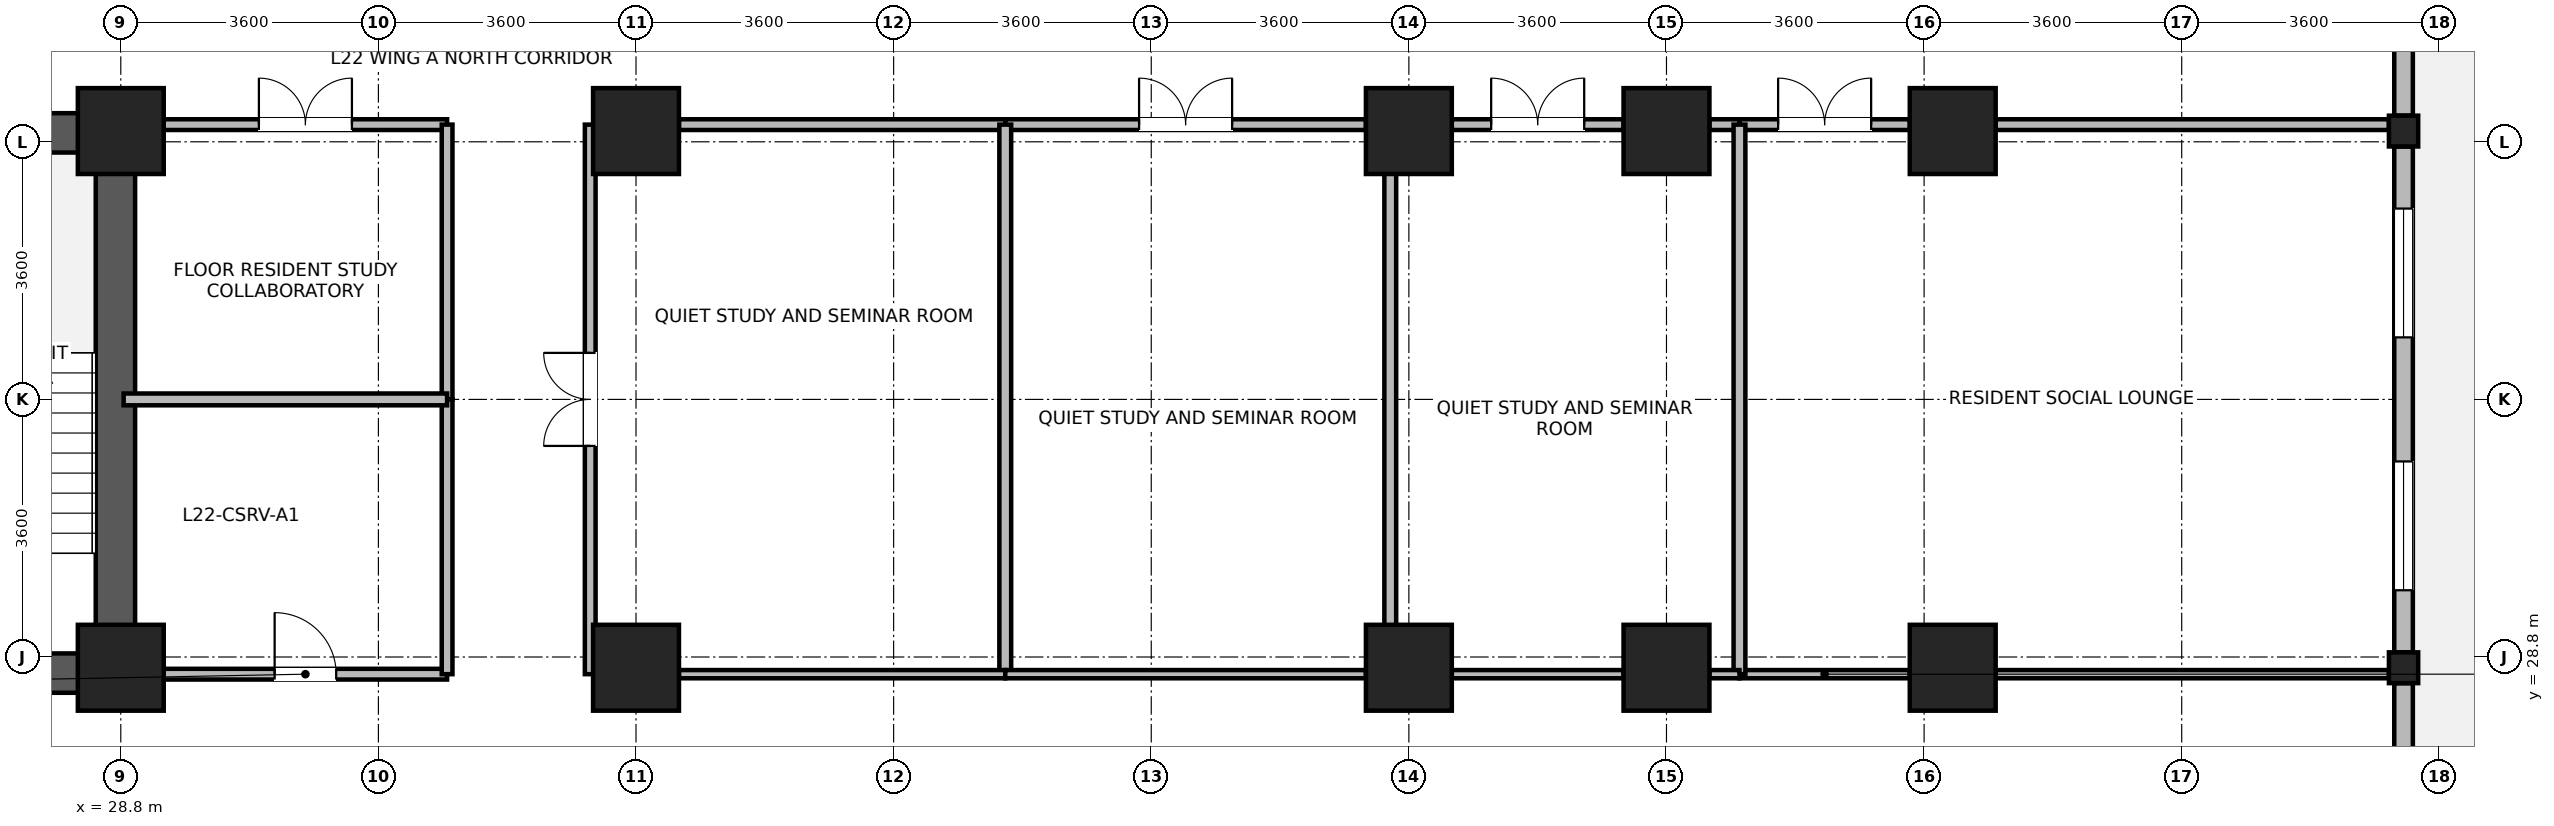
"""IFC4 building model, lengths in metres.
Left out: names, types, materials, properties, quantities, classifications, styles, units other than length and angle.
Written with IfcOpenShell. Run it as: python <this file> out.ifc"""

import sys

from ifc_helpers import new_model, si_unit, direction, frame, frame_2d, origin, origin_2d, place, context, subcontext, project, spatial, rectangle, i_section, extrude, source, transform, mapped, element, fill, save


model = new_model("IFC4")
c1 = context("Model", 3, precision=1e-05, world=origin(), true_north=direction((0.0, 1.0)))
c2 = subcontext(c1, "Body", "Model", "MODEL_VIEW")
j1 = project(units=[si_unit("LENGTHUNIT", "METRE"), si_unit("PLANEANGLEUNIT", "RADIAN")], contexts=[c1])
p1 = place(None, origin())
s1 = spatial("IfcSite", under=j1, at=p1, CompositionType="ELEMENT")
p2 = place(p1, origin())
s2 = spatial("IfcBuilding", under=s1, at=p2, CompositionType="ELEMENT")
p3 = place(p2, frame((0.0, 0.0, 89.7)))
s3 = spatial("IfcBuildingStorey", under=s2, at=p3, CompositionType="ELEMENT", Elevation=89.7)
p4 = place(p3, frame((28.725, 28.3, 0.0), z_axis=(0.0, 0.0, 1.0), x_axis=(0.0, 1.0, 0.0)))
e1 = element("IfcWall", 1, at=p4, inside=s3, PredefinedType="SHEAR", context=c2, shape_type="SweptSolid", body=[
    extrude(rectangle(XDim=8.1, YDim=0.55, at=frame_2d((4.05, 0.0))), origin(), (0.0, 0.0, 1.0), 3.45),
])
for number, where, z_axis, x_axis in (
    (2, (25.25, 28.575, 0.0), (0.0, 0.0, 1.0), (1.0, 0.0, 0.0)),
    (3, (25.25, 36.125, 0.0), (0.0, 0.0, 1.0), (1.0, 0.0, 0.0)),
):
    element("IfcWall", number, at=place(p3, frame(where, z_axis=z_axis, x_axis=x_axis)), inside=s3, PredefinedType="SHEAR", context=c2, shape_type="SweptSolid", body=[
        extrude(rectangle(XDim=3.2, YDim=0.55, at=frame_2d((1.6, 0.0))), origin(), (0.0, 0.0, 1.0), 3.45),
    ])
m1 = source(origin(), c2, "Body", "SweptSolid", [
    extrude(rectangle(XDim=1.2, YDim=1.2, at=origin_2d()), origin(), (0.0, 0.0, 1.0), 3.7),
])
for number, where, z_axis, x_axis in (
    (4, (28.8, 28.65, 0.0), (0.0, 0.0, 1.0), (1.0, 0.0, 0.0)),
    (5, (28.8, 36.15, 0.0), (0.0, 0.0, 1.0), (1.0, 0.0, 0.0)),
    (6, (36.0, 28.65, 0.0), (0.0, 0.0, 1.0), (1.0, 0.0, 0.0)),
    (7, (36.0, 36.15, 0.0), (0.0, 0.0, 1.0), (1.0, 0.0, 0.0)),
    (8, (46.8, 28.65, 0.0), (0.0, 0.0, 1.0), (1.0, 0.0, 0.0)),
    (9, (46.8, 36.15, 0.0), (0.0, 0.0, 1.0), (1.0, 0.0, 0.0)),
    (10, (50.4, 28.65, 0.0), (0.0, 0.0, 1.0), (1.0, 0.0, 0.0)),
    (11, (50.4, 36.15, 0.0), (0.0, 0.0, 1.0), (1.0, 0.0, 0.0)),
    (12, (54.4, 28.65, 0.0), (0.0, 0.0, 1.0), (1.0, 0.0, 0.0)),
    (13, (54.4, 36.15, 0.0), (0.0, 0.0, 1.0), (1.0, 0.0, 0.0)),
):
    element("IfcColumn", number, at=place(p3, frame(where, z_axis=z_axis, x_axis=x_axis)), inside=s3, PredefinedType="COLUMN", context=c2, shape_type="MappedRepresentation", body=[
        mapped(m1, transform((0.0, 0.0, 0.0), x_axis=(1.0, 0.0, 0.0), y_axis=(0.0, 1.0, 0.0), z_axis=(0.0, 0.0, 1.0), scale=1.0)),
    ])
m2 = source(origin(), c2, "Body", "SweptSolid", [
    extrude(i_section(OverallWidth=0.409, OverallDepth=0.43, WebThickness=0.024, FlangeThickness=0.033, FilletRadius=0.015, at=origin_2d()), origin(), (0.0, 0.0, 1.0), 3.7),
])
for number, where, z_axis, x_axis in (
    (14, (60.7, 28.65, 0.0), (0.0, 0.0, 1.0), (1.0, 0.0, 0.0)),
    (15, (60.7, 36.15, 0.0), (0.0, 0.0, 1.0), (1.0, 0.0, 0.0)),
):
    element("IfcColumn", number, at=place(p3, frame(where, z_axis=z_axis, x_axis=x_axis)), inside=s3, PredefinedType="COLUMN", context=c2, shape_type="MappedRepresentation", body=[
        mapped(m2, transform((0.0, 0.0, 0.0), x_axis=(1.0, 0.0, 0.0), y_axis=(0.0, 1.0, 0.0), z_axis=(0.0, 0.0, 1.0), scale=1.0)),
    ])
p5 = place(p3, frame((60.7, 28.434, 0.0), z_axis=(0.0, 0.0, 1.0), x_axis=(0.0, -1.0, 0.0)))
e16 = element("IfcWall", 16, at=p5, inside=s3, PredefinedType="STANDARD", context=c2, shape_type="SweptSolid", body=[
    extrude(rectangle(XDim=6.618, YDim=0.26, at=frame_2d((3.309, 0.0))), origin(), (0.0, 0.0, 1.0), 2.93),
])
p6 = place(p5, frame((4.063, 0.0, 0.85)))
e17 = element("IfcOpeningElement", 17, at=p6, cuts=e16, PredefinedType="OPENING", context=c2, shape_type="SweptSolid", body=[
    extrude(rectangle(XDim=1.8, YDim=1.85, at=frame_2d((0.9, 0.925))), frame((0.0, 0.14, 0.0), z_axis=(0.0, -1.0, 0.0), x_axis=(1.0, 0.0, 0.0)), (0.0, 0.0, 1.0), 0.28),
])
p7 = place(p5, frame((2.305, 0.0, 0.85)))
e18 = element("IfcOpeningElement", 18, at=p7, cuts=e16, PredefinedType="OPENING", context=c2, shape_type="SweptSolid", body=[
    extrude(rectangle(XDim=0.95, YDim=1.75, at=frame_2d((0.475, 0.875))), frame((0.0, 0.14, 0.0), z_axis=(0.0, -1.0, 0.0), x_axis=(1.0, 0.0, 0.0)), (0.0, 0.0, 1.0), 0.28),
])
p8 = place(p3, frame((60.7, 35.934, 0.0), z_axis=(0.0, 0.0, 1.0), x_axis=(0.0, -1.0, 0.0)))
e19 = element("IfcWall", 19, at=p8, inside=s3, PredefinedType="STANDARD", context=c2, shape_type="SweptSolid", body=[
    extrude(rectangle(XDim=7.068, YDim=0.26, at=frame_2d((3.534, 0.0))), origin(), (0.0, 0.0, 1.0), 2.93),
])
p9 = place(p8, frame((0.867, 0.0, 0.85)))
e20 = element("IfcOpeningElement", 20, at=p9, cuts=e19, PredefinedType="OPENING", context=c2, shape_type="SweptSolid", body=[
    extrude(rectangle(XDim=1.8, YDim=1.85, at=frame_2d((0.9, 0.925))), frame((0.0, 0.14, 0.0), z_axis=(0.0, -1.0, 0.0), x_axis=(1.0, 0.0, 0.0)), (0.0, 0.0, 1.0), 0.28),
])
p10 = place(p8, frame((4.401, 0.0, 0.85)))
e21 = element("IfcOpeningElement", 21, at=p10, cuts=e19, PredefinedType="OPENING", context=c2, shape_type="SweptSolid", body=[
    extrude(rectangle(XDim=1.8, YDim=1.85, at=frame_2d((0.9, 0.925))), frame((0.0, 0.14, 0.0), z_axis=(0.0, -1.0, 0.0), x_axis=(1.0, 0.0, 0.0)), (0.0, 0.0, 1.0), 0.28),
])
p11 = place(p3, frame((60.7, 43.33, 0.0), z_axis=(0.0, 0.0, 1.0), x_axis=(0.0, -1.0, 0.0)))
e22 = element("IfcWall", 22, at=p11, inside=s3, PredefinedType="STANDARD", context=c2, shape_type="SweptSolid", body=[
    extrude(rectangle(XDim=6.964, YDim=0.26, at=frame_2d((3.482, 0.0))), origin(), (0.0, 0.0, 1.0), 3.43),
])
p12 = place(p11, frame((0.841, 0.0, 0.85)))
e23 = element("IfcOpeningElement", 23, at=p12, cuts=e22, PredefinedType="OPENING", context=c2, shape_type="SweptSolid", body=[
    extrude(rectangle(XDim=1.8, YDim=1.85, at=frame_2d((0.9, 0.925))), frame((0.0, 0.14, 0.0), z_axis=(0.0, -1.0, 0.0), x_axis=(1.0, 0.0, 0.0)), (0.0, 0.0, 1.0), 0.28),
])
p13 = place(p11, frame((3.007, 0.0, 0.85)))
e24 = element("IfcOpeningElement", 24, at=p13, cuts=e22, PredefinedType="OPENING", context=c2, shape_type="SweptSolid", body=[
    extrude(rectangle(XDim=0.95, YDim=1.75, at=frame_2d((0.475, 0.875))), frame((0.0, 0.14, 0.0), z_axis=(0.0, -1.0, 0.0), x_axis=(1.0, 0.0, 0.0)), (0.0, 0.0, 1.0), 0.28),
])
p14 = place(p3, frame((51.42, 36.24, 0.0), z_axis=(0.0, 0.0, 1.0), x_axis=(1.0, 0.0, 0.0)))
e25 = element("IfcWall", 25, at=p14, inside=s3, PredefinedType="PARTITIONING", context=c2, shape_type="SweptSolid", body=[
    extrude(rectangle(XDim=2.38, YDim=0.15, at=frame_2d((1.19, 0.0))), origin(), (0.0, 0.0, 1.0), 2.78),
])
p15 = place(p14, frame((0.54, 0.0, 0.0)))
e26 = element("IfcOpeningElement", 26, at=p15, cuts=e25, PredefinedType="OPENING", context=c2, shape_type="SweptSolid", body=[
    extrude(rectangle(XDim=1.3, YDim=2.12, at=frame_2d((0.65, 1.06))), frame((0.0, 0.085, 0.0), z_axis=(0.0, -1.0, 0.0), x_axis=(1.0, 0.0, 0.0)), (0.0, 0.0, 1.0), 0.17),
])
p16 = place(p3, frame((55.0, 36.24, 0.0), z_axis=(0.0, 0.0, 1.0), x_axis=(1.0, 0.0, 0.0)))
e27 = element("IfcWall", 27, at=p16, inside=s3, PredefinedType="PARTITIONING", context=c2, shape_type="SweptSolid", body=[
    extrude(rectangle(XDim=5.496, YDim=0.15, at=frame_2d((2.748, 0.0))), origin(), (0.0, 0.0, 1.0), 2.78),
])
p17 = place(p3, frame((35.36, 28.56, 0.0), z_axis=(0.0, 0.0, 1.0), x_axis=(0.0, 1.0, 0.0)))
e28 = element("IfcWall", 28, at=p17, inside=s3, PredefinedType="PARTITIONING", context=c2, shape_type="SweptSolid", body=[
    extrude(rectangle(XDim=7.68, YDim=0.15, at=frame_2d((3.84, 0.0))), origin(), (0.0, 0.0, 1.0), 3.43),
])
p18 = place(p17, frame((3.19, 0.0, 0.0)))
e29 = element("IfcOpeningElement", 29, at=p18, cuts=e28, PredefinedType="OPENING", context=c2, shape_type="SweptSolid", body=[
    extrude(rectangle(XDim=1.3, YDim=2.12, at=frame_2d((0.65, 1.06))), frame((0.0, 0.085, 0.0), z_axis=(0.0, -1.0, 0.0), x_axis=(1.0, 0.0, 0.0)), (0.0, 0.0, 1.0), 0.17),
])
p19 = place(p3, frame((36.6, 36.24, 0.0), z_axis=(0.0, 0.0, 1.0), x_axis=(1.0, 0.0, 0.0)))
e30 = element("IfcWall", 30, at=p19, inside=s3, PredefinedType="PARTITIONING", context=c2, shape_type="SweptSolid", body=[
    extrude(rectangle(XDim=4.56, YDim=0.15, at=frame_2d((2.28, 0.0))), origin(), (0.0, 0.0, 1.0), 2.78),
])
p20 = place(p3, frame((41.16, 36.24, 0.0), z_axis=(0.0, 0.0, 1.0), x_axis=(1.0, 0.0, 0.0)))
e31 = element("IfcWall", 31, at=p20, inside=s3, PredefinedType="PARTITIONING", context=c2, shape_type="SweptSolid", body=[
    extrude(rectangle(XDim=5.04, YDim=0.15, at=frame_2d((2.52, 0.0))), origin(), (0.0, 0.0, 1.0), 2.78),
])
p21 = place(p20, frame((1.87, 0.0, 0.0)))
e32 = element("IfcOpeningElement", 32, at=p21, cuts=e31, PredefinedType="OPENING", context=c2, shape_type="SweptSolid", body=[
    extrude(rectangle(XDim=1.3, YDim=2.12, at=frame_2d((0.65, 1.06))), frame((0.0, 0.085, 0.0), z_axis=(0.0, -1.0, 0.0), x_axis=(1.0, 0.0, 0.0)), (0.0, 0.0, 1.0), 0.17),
])
p22 = place(p3, frame((47.4, 36.24, 0.0), z_axis=(0.0, 0.0, 1.0), x_axis=(1.0, 0.0, 0.0)))
e33 = element("IfcWall", 33, at=p22, inside=s3, PredefinedType="PARTITIONING", context=c2, shape_type="SweptSolid", body=[
    extrude(rectangle(XDim=2.4, YDim=0.15, at=frame_2d((1.2, 0.0))), origin(), (0.0, 0.0, 1.0), 2.78),
])
p23 = place(p22, frame((0.55, 0.0, 0.0)))
e34 = element("IfcOpeningElement", 34, at=p23, cuts=e33, PredefinedType="OPENING", context=c2, shape_type="SweptSolid", body=[
    extrude(rectangle(XDim=1.3, YDim=2.12, at=frame_2d((0.65, 1.06))), frame((0.0, 0.085, 0.0), z_axis=(0.0, -1.0, 0.0), x_axis=(1.0, 0.0, 0.0)), (0.0, 0.0, 1.0), 0.17),
])
p24 = place(p3, frame((51.0, 36.24, 0.0), z_axis=(0.0, 0.0, 1.0), x_axis=(1.0, 0.0, 0.0)))
e35 = element("IfcWall", 35, at=p24, inside=s3, PredefinedType="PARTITIONING", context=c2, shape_type="SweptSolid", body=[
    extrude(rectangle(XDim=0.42, YDim=0.15, at=frame_2d((0.21, 0.0))), origin(), (0.0, 0.0, 1.0), 2.78),
])
p25 = place(p3, frame((29.4, 28.56, 0.0), z_axis=(0.0, 0.0, 1.0), x_axis=(1.0, 0.0, 0.0)))
e36 = element("IfcWall", 36, at=p25, inside=s3, PredefinedType="PARTITIONING", context=c2, shape_type="SweptSolid", body=[
    extrude(rectangle(XDim=3.96, YDim=0.15, at=frame_2d((1.98, 0.0))), origin(), (0.0, 0.0, 1.0), 2.78),
])
p26 = place(p25, frame((1.55, 0.0, 0.0)))
e37 = element("IfcOpeningElement", 37, at=p26, cuts=e36, PredefinedType="OPENING", context=c2, shape_type="SweptSolid", body=[
    extrude(rectangle(XDim=0.86, YDim=2.02, at=frame_2d((0.43, 1.01))), frame((0.0, 0.085, 0.0), z_axis=(0.0, -1.0, 0.0), x_axis=(1.0, 0.0, 0.0)), (0.0, 0.0, 1.0), 0.17),
])
p27 = place(p3, frame((29.4, 36.24, 0.0), z_axis=(0.0, 0.0, 1.0), x_axis=(1.0, 0.0, 0.0)))
e38 = element("IfcWall", 38, at=p27, inside=s3, PredefinedType="PARTITIONING", context=c2, shape_type="SweptSolid", body=[
    extrude(rectangle(XDim=3.96, YDim=0.15, at=frame_2d((1.98, 0.0))), origin(), (0.0, 0.0, 1.0), 2.78),
])
p28 = place(p27, frame((1.33, 0.0, 0.0)))
e39 = element("IfcOpeningElement", 39, at=p28, cuts=e38, PredefinedType="OPENING", context=c2, shape_type="SweptSolid", body=[
    extrude(rectangle(XDim=1.3, YDim=2.12, at=frame_2d((0.65, 1.06))), frame((0.0, 0.085, 0.0), z_axis=(0.0, -1.0, 0.0), x_axis=(1.0, 0.0, 0.0)), (0.0, 0.0, 1.0), 0.17),
])
p29 = place(p3, frame((33.36, 32.4, 0.0), z_axis=(0.0, 0.0, 1.0), x_axis=(0.0, 1.0, 0.0)))
e40 = element("IfcWall", 40, at=p29, inside=s3, PredefinedType="PARTITIONING", context=c2, shape_type="SweptSolid", body=[
    extrude(rectangle(XDim=3.84, YDim=0.15, at=frame_2d((1.92, 0.0))), origin(), (0.0, 0.0, 1.0), 3.43),
])
p30 = place(p3, frame((33.36, 28.56, 0.0), z_axis=(0.0, 0.0, 1.0), x_axis=(0.0, 1.0, 0.0)))
e41 = element("IfcWall", 41, at=p30, inside=s3, PredefinedType="PARTITIONING", context=c2, shape_type="SweptSolid", body=[
    extrude(rectangle(XDim=3.84, YDim=0.15, at=frame_2d((1.92, 0.0))), origin(), (0.0, 0.0, 1.0), 3.43),
])
p31 = place(p3, frame((51.42, 28.56, 0.0), z_axis=(0.0, 0.0, 1.0), x_axis=(1.0, 0.0, 0.0)))
e42 = element("IfcWall", 42, at=p31, inside=s3, PredefinedType="PARTITIONING", context=c2, shape_type="SweptSolid", body=[
    extrude(rectangle(XDim=2.38, YDim=0.115, at=frame_2d((1.19, 0.0))), origin(), (0.0, 0.0, 1.0), 2.78),
])
p32 = place(p3, frame((55.0, 28.56, 0.0), z_axis=(0.0, 0.0, 1.0), x_axis=(1.0, 0.0, 0.0)))
e43 = element("IfcWall", 43, at=p32, inside=s3, PredefinedType="PARTITIONING", context=c2, shape_type="SweptSolid", body=[
    extrude(rectangle(XDim=5.496, YDim=0.115, at=frame_2d((2.748, 0.0))), origin(), (0.0, 0.0, 1.0), 2.78),
])
for number, where, z_axis, x_axis in (
    (44, (41.16, 28.56, 0.0), (0.0, 0.0, 1.0), (0.0, 1.0, 0.0)),
    (45, (46.54, 28.56, 0.0), (0.0, 0.0, 1.0), (0.0, 1.0, 0.0)),
    (46, (51.42, 28.56, 0.0), (0.0, 0.0, 1.0), (0.0, 1.0, 0.0)),
):
    element("IfcWall", number, at=place(p3, frame(where, z_axis=z_axis, x_axis=x_axis)), inside=s3, PredefinedType="PARTITIONING", context=c2, shape_type="SweptSolid", body=[
        extrude(rectangle(XDim=7.68, YDim=0.165, at=frame_2d((3.84, 0.0))), origin(), (0.0, 0.0, 1.0), 3.43),
    ])
p33 = place(p3, frame((36.6, 28.56, 0.0), z_axis=(0.0, 0.0, 1.0), x_axis=(1.0, 0.0, 0.0)))
e47 = element("IfcWall", 47, at=p33, inside=s3, PredefinedType="PARTITIONING", context=c2, shape_type="SweptSolid", body=[
    extrude(rectangle(XDim=4.56, YDim=0.115, at=frame_2d((2.28, 0.0))), origin(), (0.0, 0.0, 1.0), 2.78),
])
p34 = place(p3, frame((41.16, 28.56, 0.0), z_axis=(0.0, 0.0, 1.0), x_axis=(1.0, 0.0, 0.0)))
e48 = element("IfcWall", 48, at=p34, inside=s3, PredefinedType="PARTITIONING", context=c2, shape_type="SweptSolid", body=[
    extrude(rectangle(XDim=5.04, YDim=0.115, at=frame_2d((2.52, 0.0))), origin(), (0.0, 0.0, 1.0), 2.78),
])
p35 = place(p3, frame((47.4, 28.56, 0.0), z_axis=(0.0, 0.0, 1.0), x_axis=(1.0, 0.0, 0.0)))
e49 = element("IfcWall", 49, at=p35, inside=s3, PredefinedType="PARTITIONING", context=c2, shape_type="SweptSolid", body=[
    extrude(rectangle(XDim=2.4, YDim=0.115, at=frame_2d((1.2, 0.0))), origin(), (0.0, 0.0, 1.0), 2.78),
])
p36 = place(p3, frame((51.0, 28.56, 0.0), z_axis=(0.0, 0.0, 1.0), x_axis=(1.0, 0.0, 0.0)))
e50 = element("IfcWall", 50, at=p36, inside=s3, PredefinedType="PARTITIONING", context=c2, shape_type="SweptSolid", body=[
    extrude(rectangle(XDim=0.42, YDim=0.115, at=frame_2d((0.21, 0.0))), origin(), (0.0, 0.0, 1.0), 2.78),
])
p37 = place(p3, frame((28.84, 32.4, 0.0), z_axis=(0.0, 0.0, 1.0), x_axis=(1.0, 0.0, 0.0)))
e51 = element("IfcWall", 51, at=p37, inside=s3, PredefinedType="PARTITIONING", context=c2, shape_type="SweptSolid", body=[
    extrude(rectangle(XDim=4.52, YDim=0.165, at=frame_2d((2.26, 0.0))), origin(), (0.0, 0.0, 1.0), 3.43),
])
p38 = place(p9, origin())
e52 = element("IfcWindow", 52, at=p38, inside=s3, PartitioningType="SINGLE_PANEL", PredefinedType="WINDOW", context=c2, shape_type="SweptSolid", body=[
    extrude(rectangle(XDim=1.8, YDim=1.85, at=frame_2d((0.9, 0.925))), frame((0.0, 0.03, 0.0), z_axis=(0.0, -1.0, 0.0), x_axis=(1.0, 0.0, 0.0)), (0.0, 0.0, 1.0), 0.06),
])
fill(e20, e52)
p39 = place(p10, origin())
e53 = element("IfcWindow", 53, at=p39, inside=s3, PartitioningType="SINGLE_PANEL", PredefinedType="WINDOW", context=c2, shape_type="SweptSolid", body=[
    extrude(rectangle(XDim=1.8, YDim=1.85, at=frame_2d((0.9, 0.925))), frame((0.0, 0.03, 0.0), z_axis=(0.0, -1.0, 0.0), x_axis=(1.0, 0.0, 0.0)), (0.0, 0.0, 1.0), 0.06),
])
fill(e21, e53)
p40 = place(p15, origin())
e54 = element("IfcDoor", 54, at=p40, inside=s3, OperationType="DOUBLE_DOOR_SINGLE_SWING", PredefinedType="DOOR", context=c2, shape_type="SweptSolid", body=[
    extrude(rectangle(XDim=1.3, YDim=2.12, at=frame_2d((0.65, 1.06))), frame((0.0, 0.025, 0.0), z_axis=(0.0, -1.0, 0.0), x_axis=(1.0, 0.0, 0.0)), (0.0, 0.0, 1.0), 0.05),
])
fill(e26, e54)
p41 = place(p18, origin())
e55 = element("IfcDoor", 55, at=p41, inside=s3, OperationType="DOUBLE_DOOR_SINGLE_SWING", PredefinedType="DOOR", context=c2, shape_type="SweptSolid", body=[
    extrude(rectangle(XDim=1.3, YDim=2.12, at=frame_2d((0.65, 1.06))), frame((0.0, 0.025, 0.0), z_axis=(0.0, -1.0, 0.0), x_axis=(1.0, 0.0, 0.0)), (0.0, 0.0, 1.0), 0.05),
])
fill(e29, e55)
p42 = place(p21, origin())
e56 = element("IfcDoor", 56, at=p42, inside=s3, OperationType="DOUBLE_DOOR_SINGLE_SWING", PredefinedType="DOOR", context=c2, shape_type="SweptSolid", body=[
    extrude(rectangle(XDim=1.3, YDim=2.12, at=frame_2d((0.65, 1.06))), frame((0.0, 0.025, 0.0), z_axis=(0.0, -1.0, 0.0), x_axis=(1.0, 0.0, 0.0)), (0.0, 0.0, 1.0), 0.05),
])
fill(e32, e56)
p43 = place(p23, origin())
e57 = element("IfcDoor", 57, at=p43, inside=s3, OperationType="DOUBLE_DOOR_SINGLE_SWING", PredefinedType="DOOR", context=c2, shape_type="SweptSolid", body=[
    extrude(rectangle(XDim=1.3, YDim=2.12, at=frame_2d((0.65, 1.06))), frame((0.0, 0.025, 0.0), z_axis=(0.0, -1.0, 0.0), x_axis=(1.0, 0.0, 0.0)), (0.0, 0.0, 1.0), 0.05),
])
fill(e34, e57)
p44 = place(p26, origin())
e58 = element("IfcDoor", 58, at=p44, inside=s3, OperationType="SINGLE_SWING_LEFT", PredefinedType="DOOR", context=c2, shape_type="SweptSolid", body=[
    extrude(rectangle(XDim=0.86, YDim=2.02, at=frame_2d((0.43, 1.01))), frame((0.0, 0.025, 0.0), z_axis=(0.0, -1.0, 0.0), x_axis=(1.0, 0.0, 0.0)), (0.0, 0.0, 1.0), 0.05),
])
fill(e37, e58)
p45 = place(p28, origin())
e59 = element("IfcDoor", 59, at=p45, inside=s3, OperationType="DOUBLE_DOOR_SINGLE_SWING", PredefinedType="DOOR", context=c2, shape_type="SweptSolid", body=[
    extrude(rectangle(XDim=1.3, YDim=2.12, at=frame_2d((0.65, 1.06))), frame((0.0, 0.025, 0.0), z_axis=(0.0, -1.0, 0.0), x_axis=(1.0, 0.0, 0.0)), (0.0, 0.0, 1.0), 0.05),
])
fill(e39, e59)
save(model, sys.argv[1])
